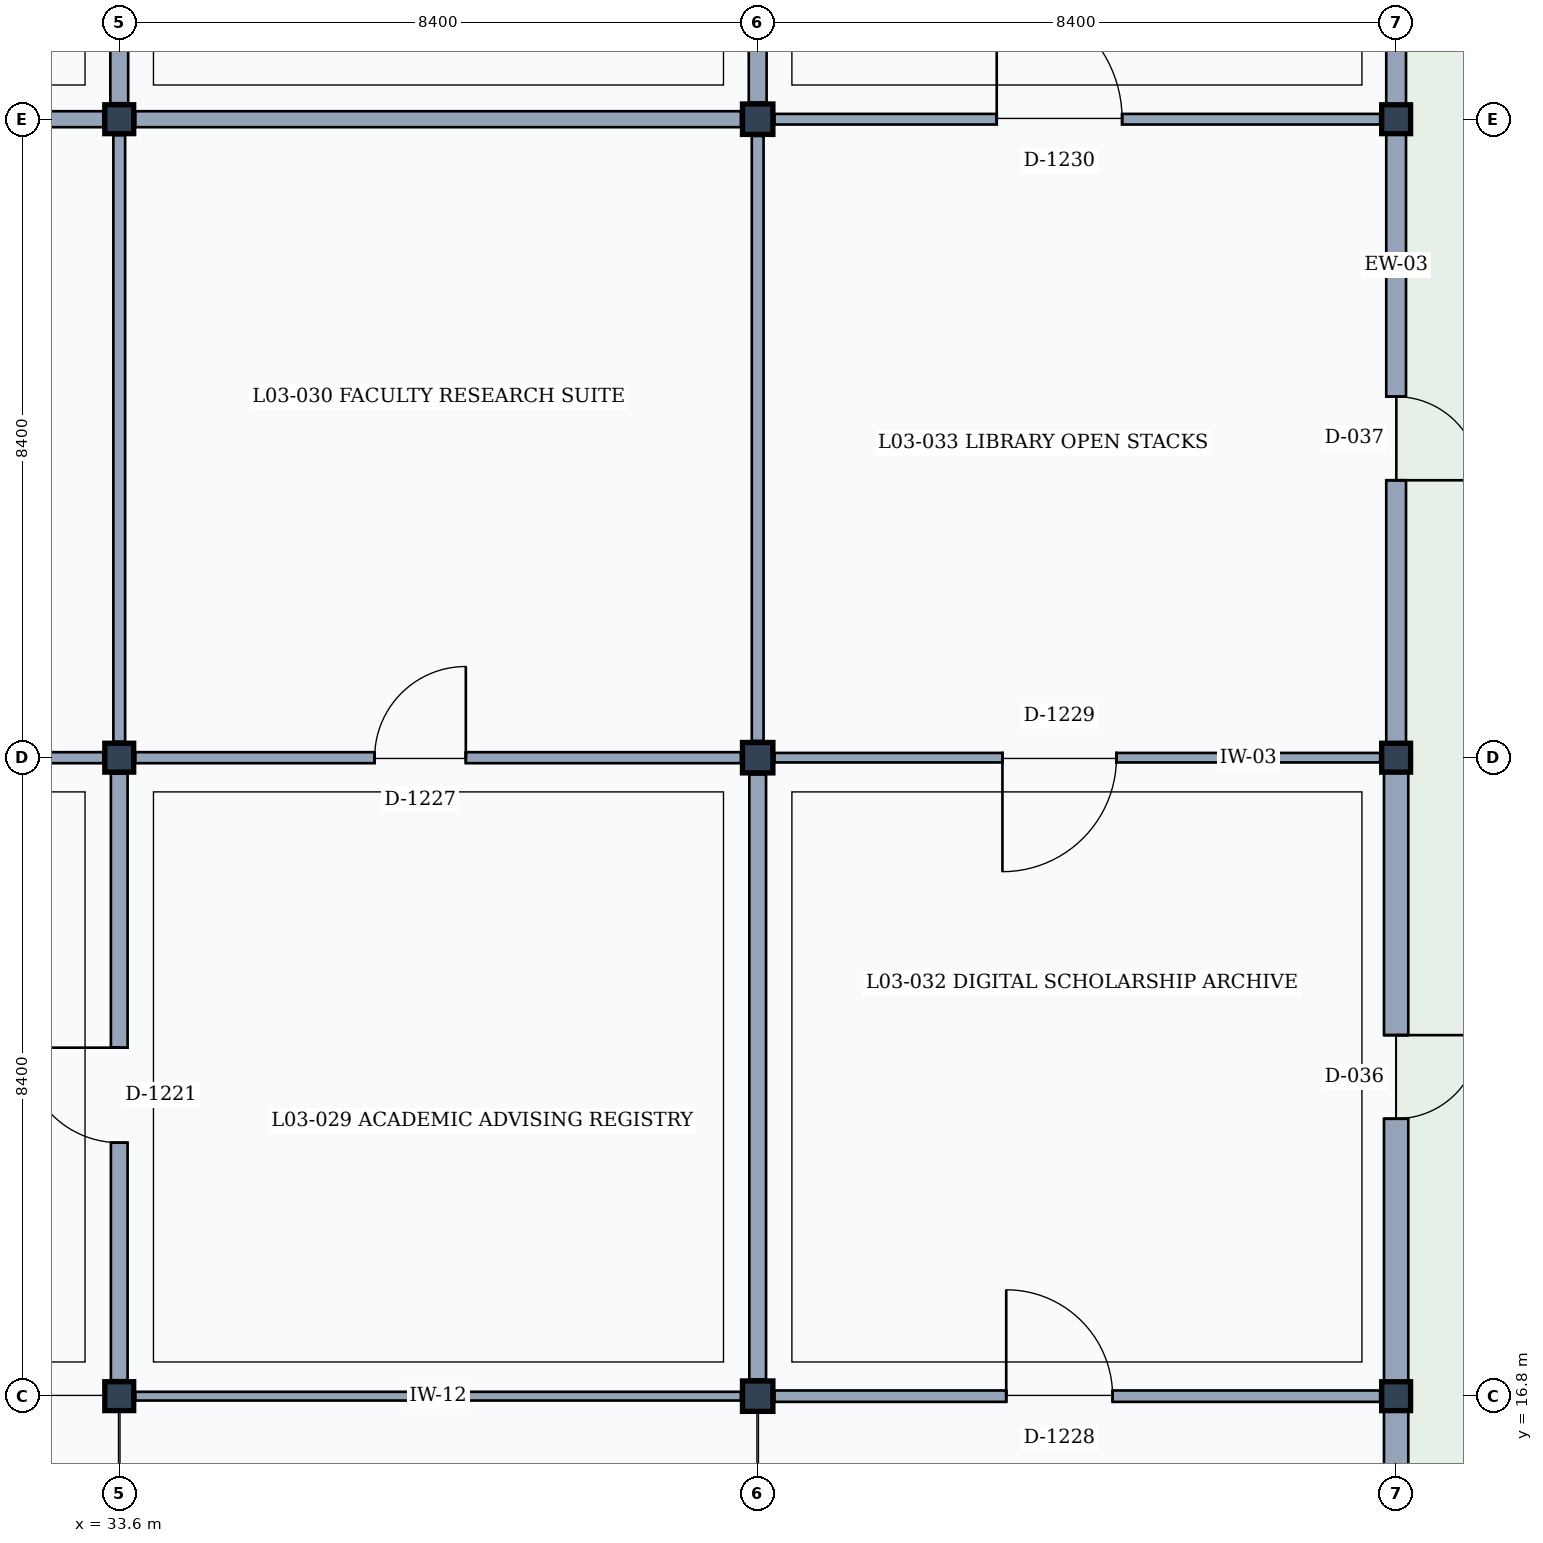
"""IFC4 building model, lengths in metres.
Left out: names, types, materials, properties, quantities, classifications, styles, units other than length and angle.
Written with IfcOpenShell. Run it as: python <this file> out.ifc"""

import sys

from ifc_helpers import new_model, si_unit, direction, frame, frame_2d, origin, origin_2d, place, context, subcontext, project, spatial, rectangle, extrude, element, fill, save


model = new_model("IFC4")
c1 = context("Model", 3, precision=1e-05, world=origin(), true_north=direction((0.0, 1.0)))
c2 = subcontext(c1, "Body", "Model", "MODEL_VIEW")
j1 = project(units=[si_unit("LENGTHUNIT", "METRE"), si_unit("PLANEANGLEUNIT", "RADIAN")], contexts=[c1])
p1 = place(None, origin())
s1 = spatial("IfcSite", under=j1, at=p1, CompositionType="ELEMENT")
p2 = place(p1, origin())
s2 = spatial("IfcBuilding", under=s1, at=p2, CompositionType="ELEMENT")
p3 = place(p2, frame((0.0, 0.0, 13.8)))
s3 = spatial("IfcBuildingStorey", under=s2, at=p3, CompositionType="ELEMENT", Elevation=13.8)
for number, where, z_axis, x_axis in (
    (1, (33.6, 16.8, 0.0), (0.0, 0.0, 1.0), (1.0, 0.0, 0.0)),
    (2, (33.6, 25.2, 0.0), (0.0, 0.0, 1.0), (1.0, 0.0, 0.0)),
    (3, (33.6, 33.6, 0.0), (0.0, 0.0, 1.0), (1.0, 0.0, 0.0)),
):
    element("IfcColumn", number, at=place(p3, frame(where, z_axis=z_axis, x_axis=x_axis)), inside=s3, PredefinedType="COLUMN", context=c2, shape_type="SweptSolid", body=[
        extrude(rectangle(XDim=0.38, YDim=0.38, at=origin_2d()), origin(), (0.0, 0.0, 1.0), 4.2),
    ])
for number, where, z_axis, x_axis in (
    (4, (42.0, 16.8, 0.0), (0.0, 0.0, 1.0), (1.0, 0.0, 0.0)),
    (5, (42.0, 25.2, 0.0), (0.0, 0.0, 1.0), (1.0, 0.0, 0.0)),
    (6, (42.0, 33.6, 0.0), (0.0, 0.0, 1.0), (1.0, 0.0, 0.0)),
):
    element("IfcColumn", number, at=place(p3, frame(where, z_axis=z_axis, x_axis=x_axis)), inside=s3, PredefinedType="COLUMN", context=c2, shape_type="SweptSolid", body=[
        extrude(rectangle(XDim=0.4, YDim=0.4, at=origin_2d()), origin(), (0.0, 0.0, 1.0), 4.2),
    ])
for number, where, z_axis, x_axis in (
    (7, (50.4, 16.8, 0.0), (0.0, 0.0, 1.0), (1.0, 0.0, 0.0)),
    (8, (50.4, 25.2, 0.0), (0.0, 0.0, 1.0), (1.0, 0.0, 0.0)),
    (9, (50.4, 33.6, 0.0), (0.0, 0.0, 1.0), (1.0, 0.0, 0.0)),
):
    element("IfcColumn", number, at=place(p3, frame(where, z_axis=z_axis, x_axis=x_axis)), inside=s3, PredefinedType="COLUMN", context=c2, shape_type="SweptSolid", body=[
        extrude(rectangle(XDim=0.38, YDim=0.38, at=origin_2d()), origin(), (0.0, 0.0, 1.0), 4.2),
    ])
p4 = place(p3, frame((50.4, 16.61, 0.0), z_axis=(0.0, 0.0, 1.0), x_axis=(0.0, -1.0, 0.0)))
e10 = element("IfcWall", 10, at=p4, inside=s3, PredefinedType="SOLIDWALL", context=c2, shape_type="SweptSolid", body=[
    extrude(rectangle(XDim=8.02, YDim=0.32, at=frame_2d((4.01, 0.0))), origin(), (0.0, 0.0, 1.0), 3.36),
])
p5 = place(p4, frame((3.46, 0.0, 0.0)))
e11 = element("IfcOpeningElement", 11, at=p5, cuts=e10, PredefinedType="OPENING", context=c2, shape_type="SweptSolid", body=[
    extrude(rectangle(XDim=1.1, YDim=2.2, at=frame_2d((0.55, 1.1))), frame((0.0, 0.17, 0.0), z_axis=(0.0, -1.0, 0.0), x_axis=(1.0, 0.0, 0.0)), (0.0, 0.0, 1.0), 0.34),
])
p6 = place(p3, frame((50.4, 25.01, 0.0), z_axis=(0.0, 0.0, 1.0), x_axis=(0.0, -1.0, 0.0)))
e12 = element("IfcWall", 12, at=p6, inside=s3, PredefinedType="SOLIDWALL", context=c2, shape_type="SweptSolid", body=[
    extrude(rectangle(XDim=8.02, YDim=0.32, at=frame_2d((4.01, 0.0))), origin(), (0.0, 0.0, 1.0), 3.36),
])
p7 = place(p6, frame((3.46, 0.0, 0.0)))
e13 = element("IfcOpeningElement", 13, at=p7, cuts=e12, PredefinedType="OPENING", context=c2, shape_type="SweptSolid", body=[
    extrude(rectangle(XDim=1.1, YDim=2.2, at=frame_2d((0.55, 1.1))), frame((0.0, 0.17, 0.0), z_axis=(0.0, -1.0, 0.0), x_axis=(1.0, 0.0, 0.0)), (0.0, 0.0, 1.0), 0.34),
])
p8 = place(p3, frame((50.4, 33.41, 0.0), z_axis=(0.0, 0.0, 1.0), x_axis=(0.0, -1.0, 0.0)))
e14 = element("IfcWall", 14, at=p8, inside=s3, PredefinedType="SOLIDWALL", context=c2, shape_type="SweptSolid", body=[
    extrude(rectangle(XDim=8.02, YDim=0.26, at=frame_2d((4.01, 0.0))), origin(), (0.0, 0.0, 1.0), 3.36),
])
p9 = place(p8, frame((3.46, 0.0, 0.0)))
e15 = element("IfcOpeningElement", 15, at=p9, cuts=e14, PredefinedType="OPENING", context=c2, shape_type="SweptSolid", body=[
    extrude(rectangle(XDim=1.1, YDim=2.2, at=frame_2d((0.55, 1.1))), frame((0.0, 0.14, 0.0), z_axis=(0.0, -1.0, 0.0), x_axis=(1.0, 0.0, 0.0)), (0.0, 0.0, 1.0), 0.28),
])
p10 = place(p3, frame((50.4, 41.83, 0.0), z_axis=(0.0, 0.0, 1.0), x_axis=(0.0, -1.0, 0.0)))
e16 = element("IfcWall", 16, at=p10, inside=s3, PredefinedType="SOLIDWALL", context=c2, shape_type="SweptSolid", body=[
    extrude(rectangle(XDim=8.04, YDim=0.26, at=frame_2d((4.02, 0.0))), origin(), (0.0, 0.0, 1.0), 3.36),
])
p11 = place(p10, frame((3.47, 0.0, 0.0)))
e17 = element("IfcOpeningElement", 17, at=p11, cuts=e16, PredefinedType="OPENING", context=c2, shape_type="SweptSolid", body=[
    extrude(rectangle(XDim=1.1, YDim=2.2, at=frame_2d((0.55, 1.1))), frame((0.0, 0.14, 0.0), z_axis=(0.0, -1.0, 0.0), x_axis=(1.0, 0.0, 0.0)), (0.0, 0.0, 1.0), 0.28),
])
p12 = place(p3, frame((33.6, 17.01, 0.0), z_axis=(0.0, 0.0, 1.0), x_axis=(0.0, 1.0, 0.0)))
e18 = element("IfcWall", 18, at=p12, inside=s3, PredefinedType="PARTITIONING", context=c2, shape_type="SweptSolid", body=[
    extrude(rectangle(XDim=7.98, YDim=0.22, at=frame_2d((3.99, 0.0))), origin(), (0.0, 0.0, 1.0), 3.32),
])
p13 = place(p12, frame((3.125, 0.0, 0.0)))
e19 = element("IfcOpeningElement", 19, at=p13, cuts=e18, PredefinedType="OPENING", context=c2, shape_type="SweptSolid", body=[
    extrude(rectangle(XDim=1.25, YDim=2.3, at=frame_2d((0.625, 1.15))), frame((0.0, 0.12, 0.0), z_axis=(0.0, -1.0, 0.0), x_axis=(1.0, 0.0, 0.0)), (0.0, 0.0, 1.0), 0.24),
])
p14 = place(p3, frame((25.42, 25.2, 0.0), z_axis=(0.0, 0.0, 1.0), x_axis=(1.0, 0.0, 0.0)))
e20 = element("IfcWall", 20, at=p14, inside=s3, PredefinedType="PARTITIONING", context=c2, shape_type="SweptSolid", body=[
    extrude(rectangle(XDim=7.97, YDim=0.145, at=frame_2d((3.985, 0.0))), origin(), (0.0, 0.0, 1.0), 3.32),
])
p15 = place(p14, frame((3.075, 0.0, 0.0)))
e21 = element("IfcOpeningElement", 21, at=p15, cuts=e20, PredefinedType="OPENING", context=c2, shape_type="SweptSolid", body=[
    extrude(rectangle(XDim=1.35, YDim=2.25, at=frame_2d((0.675, 1.125))), frame((0.0, 0.083, 0.0), z_axis=(0.0, -1.0, 0.0), x_axis=(1.0, 0.0, 0.0)), (0.0, 0.0, 1.0), 0.165),
])
p16 = place(p3, frame((33.6, 25.41, 0.0), z_axis=(0.0, 0.0, 1.0), x_axis=(0.0, 1.0, 0.0)))
e22 = element("IfcWall", 22, at=p16, inside=s3, PredefinedType="PARTITIONING", context=c2, shape_type="SweptSolid", body=[
    extrude(rectangle(XDim=7.98, YDim=0.155, at=frame_2d((3.99, 0.0))), origin(), (0.0, 0.0, 1.0), 3.32),
])
p17 = place(p3, frame((25.42, 33.6, 0.0), z_axis=(0.0, 0.0, 1.0), x_axis=(1.0, 0.0, 0.0)))
e23 = element("IfcWall", 23, at=p17, inside=s3, PredefinedType="PARTITIONING", context=c2, shape_type="SweptSolid", body=[
    extrude(rectangle(XDim=7.97, YDim=0.21, at=frame_2d((3.985, 0.0))), origin(), (0.0, 0.0, 1.0), 3.32),
])
p18 = place(p3, frame((33.6, 33.81, 0.0), z_axis=(0.0, 0.0, 1.0), x_axis=(0.0, 1.0, 0.0)))
e24 = element("IfcWall", 24, at=p18, inside=s3, PredefinedType="PARTITIONING", context=c2, shape_type="SweptSolid", body=[
    extrude(rectangle(XDim=8.0, YDim=0.235, at=frame_2d((4.0, 0.0))), origin(), (0.0, 0.0, 1.0), 3.32),
])
p19 = place(p18, frame((3.025, 0.0, 0.0)))
e25 = element("IfcOpeningElement", 25, at=p19, cuts=e24, PredefinedType="OPENING", context=c2, shape_type="SweptSolid", body=[
    extrude(rectangle(XDim=1.45, YDim=2.35, at=frame_2d((0.725, 1.175))), frame((0.0, 0.127, 0.0), z_axis=(0.0, -1.0, 0.0), x_axis=(1.0, 0.0, 0.0)), (0.0, 0.0, 1.0), 0.255),
])
p20 = place(p3, frame((33.81, 16.8, 0.0), z_axis=(0.0, 0.0, 1.0), x_axis=(1.0, 0.0, 0.0)))
e26 = element("IfcWall", 26, at=p20, inside=s3, PredefinedType="PARTITIONING", context=c2, shape_type="SweptSolid", body=[
    extrude(rectangle(XDim=7.97, YDim=0.115, at=frame_2d((3.985, 0.0))), origin(), (0.0, 0.0, 1.0), 3.32),
])
p21 = place(p3, frame((42.0, 17.02, 0.0), z_axis=(0.0, 0.0, 1.0), x_axis=(0.0, 1.0, 0.0)))
e27 = element("IfcWall", 27, at=p21, inside=s3, PredefinedType="PARTITIONING", context=c2, shape_type="SweptSolid", body=[
    extrude(rectangle(XDim=7.96, YDim=0.22, at=frame_2d((3.98, 0.0))), origin(), (0.0, 0.0, 1.0), 3.32),
])
p22 = place(p3, frame((33.81, 25.2, 0.0), z_axis=(0.0, 0.0, 1.0), x_axis=(1.0, 0.0, 0.0)))
e28 = element("IfcWall", 28, at=p22, inside=s3, PredefinedType="PARTITIONING", context=c2, shape_type="SweptSolid", body=[
    extrude(rectangle(XDim=7.97, YDim=0.145, at=frame_2d((3.985, 0.0))), origin(), (0.0, 0.0, 1.0), 3.32),
])
p23 = place(p22, frame((3.15, 0.0, 0.0)))
e29 = element("IfcOpeningElement", 29, at=p23, cuts=e28, PredefinedType="OPENING", context=c2, shape_type="SweptSolid", body=[
    extrude(rectangle(XDim=1.2, YDim=2.2, at=frame_2d((0.6, 1.1))), frame((0.0, 0.083, 0.0), z_axis=(0.0, -1.0, 0.0), x_axis=(1.0, 0.0, 0.0)), (0.0, 0.0, 1.0), 0.165),
])
p24 = place(p3, frame((42.0, 25.42, 0.0), z_axis=(0.0, 0.0, 1.0), x_axis=(0.0, 1.0, 0.0)))
e30 = element("IfcWall", 30, at=p24, inside=s3, PredefinedType="PARTITIONING", context=c2, shape_type="SweptSolid", body=[
    extrude(rectangle(XDim=7.96, YDim=0.155, at=frame_2d((3.98, 0.0))), origin(), (0.0, 0.0, 1.0), 3.32),
])
p25 = place(p3, frame((33.81, 33.6, 0.0), z_axis=(0.0, 0.0, 1.0), x_axis=(1.0, 0.0, 0.0)))
e31 = element("IfcWall", 31, at=p25, inside=s3, PredefinedType="PARTITIONING", context=c2, shape_type="SweptSolid", body=[
    extrude(rectangle(XDim=7.97, YDim=0.21, at=frame_2d((3.985, 0.0))), origin(), (0.0, 0.0, 1.0), 3.32),
])
p26 = place(p3, frame((42.0, 33.82, 0.0), z_axis=(0.0, 0.0, 1.0), x_axis=(0.0, 1.0, 0.0)))
e32 = element("IfcWall", 32, at=p26, inside=s3, PredefinedType="PARTITIONING", context=c2, shape_type="SweptSolid", body=[
    extrude(rectangle(XDim=7.99, YDim=0.235, at=frame_2d((3.995, 0.0))), origin(), (0.0, 0.0, 1.0), 3.32),
])
p27 = place(p3, frame((42.22, 16.8, 0.0), z_axis=(0.0, 0.0, 1.0), x_axis=(1.0, 0.0, 0.0)))
e33 = element("IfcWall", 33, at=p27, inside=s3, PredefinedType="PARTITIONING", context=c2, shape_type="SweptSolid", body=[
    extrude(rectangle(XDim=7.97, YDim=0.15, at=frame_2d((3.985, 0.0))), origin(), (0.0, 0.0, 1.0), 3.32),
])
p28 = place(p27, frame((3.05, 0.0, 0.0)))
e34 = element("IfcOpeningElement", 34, at=p28, cuts=e33, PredefinedType="OPENING", context=c2, shape_type="SweptSolid", body=[
    extrude(rectangle(XDim=1.4, YDim=2.25, at=frame_2d((0.7, 1.125))), frame((0.0, 0.085, 0.0), z_axis=(0.0, -1.0, 0.0), x_axis=(1.0, 0.0, 0.0)), (0.0, 0.0, 1.0), 0.17),
])
p29 = place(p3, frame((42.22, 25.2, 0.0), z_axis=(0.0, 0.0, 1.0), x_axis=(1.0, 0.0, 0.0)))
e35 = element("IfcWall", 35, at=p29, inside=s3, PredefinedType="PARTITIONING", context=c2, shape_type="SweptSolid", body=[
    extrude(rectangle(XDim=7.97, YDim=0.125, at=frame_2d((3.985, 0.0))), origin(), (0.0, 0.0, 1.0), 3.32),
])
p30 = place(p29, frame((3.0, 0.0, 0.0)))
e36 = element("IfcOpeningElement", 36, at=p30, cuts=e35, PredefinedType="OPENING", context=c2, shape_type="SweptSolid", body=[
    extrude(rectangle(XDim=1.5, YDim=2.3, at=frame_2d((0.75, 1.15))), frame((0.0, 0.073, 0.0), z_axis=(0.0, -1.0, 0.0), x_axis=(1.0, 0.0, 0.0)), (0.0, 0.0, 1.0), 0.145),
])
p31 = place(p3, frame((42.22, 33.6, 0.0), z_axis=(0.0, 0.0, 1.0), x_axis=(1.0, 0.0, 0.0)))
e37 = element("IfcWall", 37, at=p31, inside=s3, PredefinedType="PARTITIONING", context=c2, shape_type="SweptSolid", body=[
    extrude(rectangle(XDim=7.97, YDim=0.14, at=frame_2d((3.985, 0.0))), origin(), (0.0, 0.0, 1.0), 3.32),
])
p32 = place(p31, frame((2.925, 0.0, 0.0)))
e38 = element("IfcOpeningElement", 38, at=p32, cuts=e37, PredefinedType="OPENING", context=c2, shape_type="SweptSolid", body=[
    extrude(rectangle(XDim=1.65, YDim=2.25, at=frame_2d((0.825, 1.125))), frame((0.0, 0.08, 0.0), z_axis=(0.0, -1.0, 0.0), x_axis=(1.0, 0.0, 0.0)), (0.0, 0.0, 1.0), 0.16),
])
p33 = place(p7, origin())
e39 = element("IfcDoor", 39, at=p33, inside=s3, OperationType="SINGLE_SWING_LEFT", PredefinedType="DOOR", context=c2, shape_type="SweptSolid", body=[
    extrude(rectangle(XDim=1.1, YDim=2.2, at=frame_2d((0.55, 1.1))), frame((0.0, 0.025, 0.0), z_axis=(0.0, -1.0, 0.0), x_axis=(1.0, 0.0, 0.0)), (0.0, 0.0, 1.0), 0.05),
])
fill(e13, e39)
p34 = place(p9, origin())
e40 = element("IfcDoor", 40, at=p34, inside=s3, OperationType="SINGLE_SWING_RIGHT", PredefinedType="DOOR", context=c2, shape_type="SweptSolid", body=[
    extrude(rectangle(XDim=1.1, YDim=2.2, at=frame_2d((0.55, 1.1))), frame((0.0, 0.025, 0.0), z_axis=(0.0, -1.0, 0.0), x_axis=(1.0, 0.0, 0.0)), (0.0, 0.0, 1.0), 0.05),
])
fill(e15, e40)
p35 = place(p13, origin())
e41 = element("IfcDoor", 41, at=p35, inside=s3, OperationType="SINGLE_SWING_RIGHT", PredefinedType="DOOR", context=c2, shape_type="SweptSolid", body=[
    extrude(rectangle(XDim=1.25, YDim=2.3, at=frame_2d((0.625, 1.15))), frame((0.0, 0.025, 0.0), z_axis=(0.0, -1.0, 0.0), x_axis=(1.0, 0.0, 0.0)), (0.0, 0.0, 1.0), 0.05),
])
fill(e19, e41)
p36 = place(p23, origin())
e42 = element("IfcDoor", 42, at=p36, inside=s3, OperationType="SINGLE_SWING_RIGHT", PredefinedType="DOOR", context=c2, shape_type="SweptSolid", body=[
    extrude(rectangle(XDim=1.2, YDim=2.2, at=frame_2d((0.6, 1.1))), frame((0.0, 0.025, 0.0), z_axis=(0.0, -1.0, 0.0), x_axis=(1.0, 0.0, 0.0)), (0.0, 0.0, 1.0), 0.05),
])
fill(e29, e42)
p37 = place(p28, origin())
e43 = element("IfcDoor", 43, at=p37, inside=s3, OperationType="SINGLE_SWING_LEFT", PredefinedType="DOOR", context=c2, shape_type="SweptSolid", body=[
    extrude(rectangle(XDim=1.4, YDim=2.25, at=frame_2d((0.7, 1.125))), frame((0.0, 0.025, 0.0), z_axis=(0.0, -1.0, 0.0), x_axis=(1.0, 0.0, 0.0)), (0.0, 0.0, 1.0), 0.05),
])
fill(e34, e43)
p38 = place(p30, frame((1.5, 0.0, 0.0), z_axis=(0.0, 0.0, 1.0), x_axis=(-1.0, 0.0, 0.0)))
e44 = element("IfcDoor", 44, at=p38, inside=s3, OperationType="SINGLE_SWING_RIGHT", PredefinedType="DOOR", context=c2, shape_type="SweptSolid", body=[
    extrude(rectangle(XDim=1.5, YDim=2.3, at=frame_2d((0.75, 1.15))), frame((0.0, 0.025, 0.0), z_axis=(0.0, -1.0, 0.0), x_axis=(1.0, 0.0, 0.0)), (0.0, 0.0, 1.0), 0.05),
])
fill(e36, e44)
p39 = place(p32, origin())
e45 = element("IfcDoor", 45, at=p39, inside=s3, OperationType="SINGLE_SWING_LEFT", PredefinedType="DOOR", context=c2, shape_type="SweptSolid", body=[
    extrude(rectangle(XDim=1.65, YDim=2.25, at=frame_2d((0.825, 1.125))), frame((0.0, 0.025, 0.0), z_axis=(0.0, -1.0, 0.0), x_axis=(1.0, 0.0, 0.0)), (0.0, 0.0, 1.0), 0.05),
])
fill(e38, e45)
save(model, sys.argv[1])
